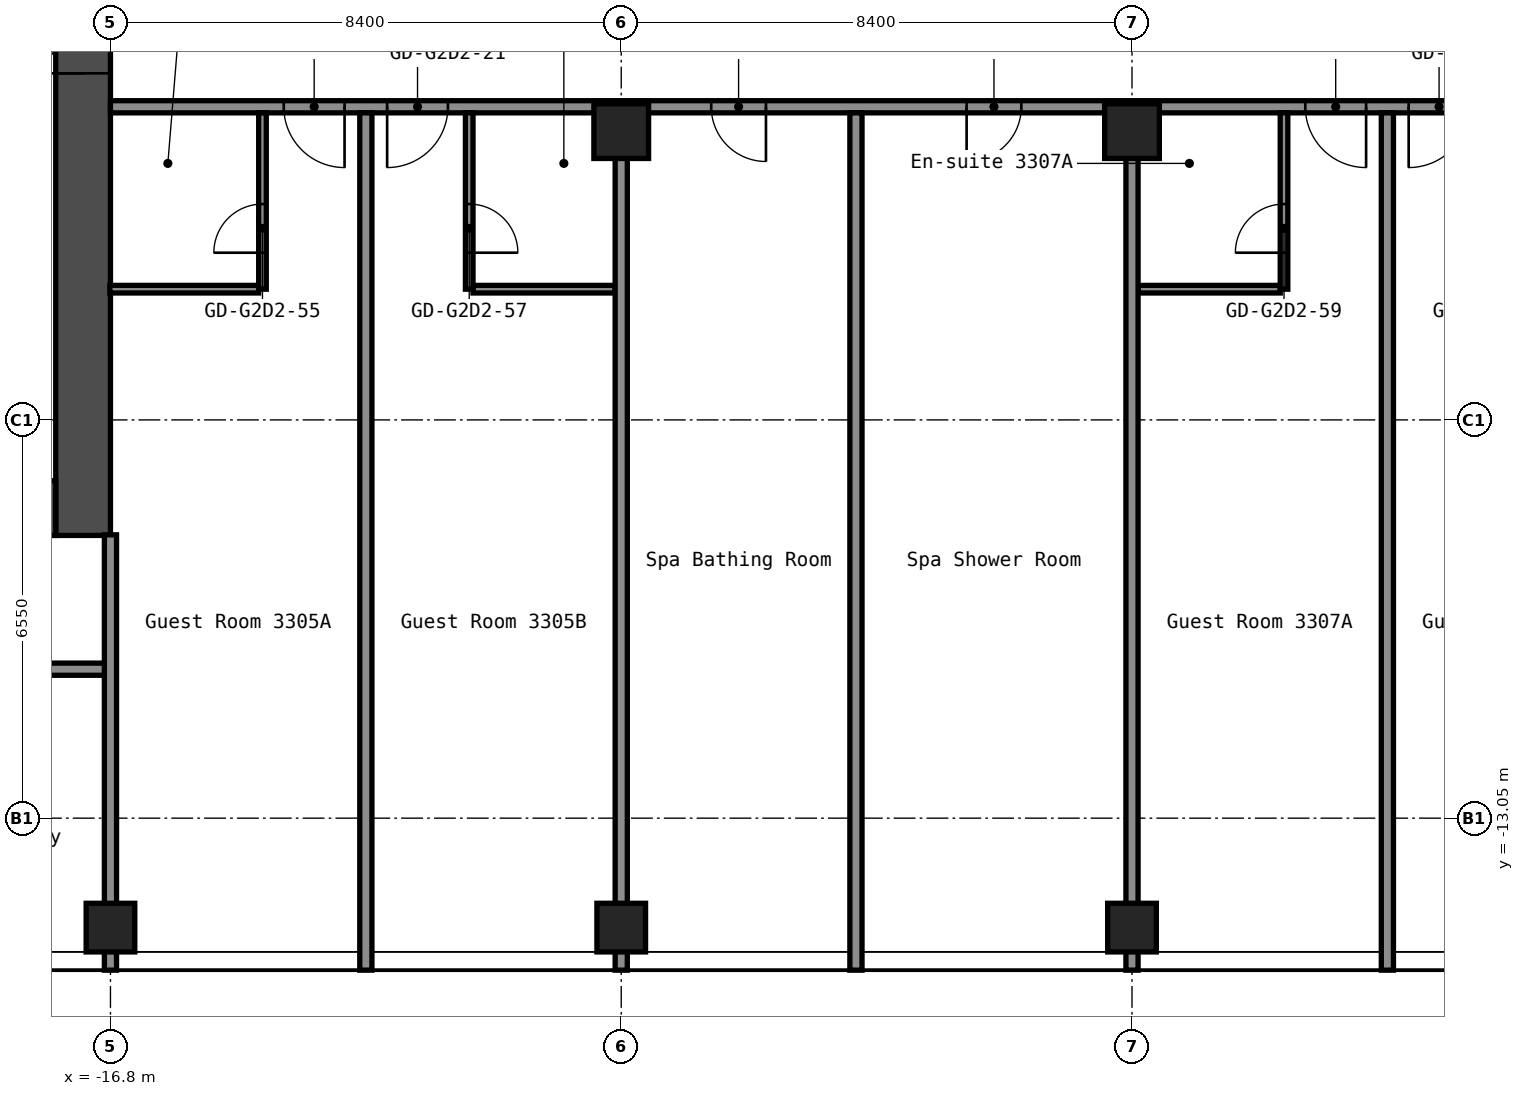
"""IFC4 building model, lengths in metres.
Left out: names, types, materials, properties, quantities, classifications, styles, units other than length and angle.
Written with IfcOpenShell. Run it as: python <this file> out.ifc"""

import sys

from ifc_helpers import new_model, si_unit, direction, frame, frame_2d, origin, origin_2d, place, context, subcontext, project, spatial, rectangle, hollow_rectangle, extrude, element, fill, save


model = new_model("IFC4")
c1 = context("Model", 3, precision=1e-05, world=origin(), true_north=direction((0.0, 1.0)))
c2 = subcontext(c1, "Body", "Model", "MODEL_VIEW")
j1 = project(units=[si_unit("LENGTHUNIT", "METRE"), si_unit("PLANEANGLEUNIT", "RADIAN")], contexts=[c1])
p1 = place(None, origin())
s1 = spatial("IfcSite", under=j1, at=p1, CompositionType="ELEMENT")
p2 = place(p1, origin())
s2 = spatial("IfcBuilding", under=s1, at=p2, CompositionType="ELEMENT")
p3 = place(p2, frame((0.0, 0.0, 117.0)))
s3 = spatial("IfcBuildingStorey", under=s2, at=p3, CompositionType="ELEMENT", Elevation=117.0)
for number, where, z_axis, x_axis in (
    (1, (-16.8, -14.85, 0.0), (0.0, 0.0, 1.0), (1.0, 0.0, 0.0)),
    (2, (-8.4, -14.85, 0.0), (0.0, 0.0, 1.0), (1.0, 0.0, 0.0)),
):
    element("IfcColumn", number, at=place(p3, frame(where, z_axis=z_axis, x_axis=x_axis)), inside=s3, PredefinedType="COLUMN", context=c2, shape_type="SweptSolid", body=[
        extrude(hollow_rectangle(XDim=0.8, YDim=0.8, WallThickness=0.032, at=origin_2d()), origin(), (0.0, 0.0, 1.0), 2.9),
    ])
p4 = place(p3, frame((-8.4, -1.75, 0.0), z_axis=(0.0, 0.0, 1.0), x_axis=(1.0, 0.0, 0.0)))
e3 = element("IfcColumn", 3, at=p4, inside=s3, PredefinedType="COLUMN", context=c2, shape_type="SweptSolid", body=[
    extrude(hollow_rectangle(XDim=0.9, YDim=0.9, WallThickness=0.036, at=origin_2d()), origin(), (0.0, 0.0, 1.0), 2.9),
])
p5 = place(p3, frame((0.0, -14.85, 0.0), z_axis=(0.0, 0.0, 1.0), x_axis=(1.0, 0.0, 0.0)))
e4 = element("IfcColumn", 4, at=p5, inside=s3, PredefinedType="COLUMN", context=c2, shape_type="SweptSolid", body=[
    extrude(hollow_rectangle(XDim=0.8, YDim=0.8, WallThickness=0.032, at=origin_2d()), origin(), (0.0, 0.0, 1.0), 2.9),
])
p6 = place(p3, frame((0.0, -1.75, 0.0), z_axis=(0.0, 0.0, 1.0), x_axis=(1.0, 0.0, 0.0)))
e5 = element("IfcColumn", 5, at=p6, inside=s3, PredefinedType="COLUMN", context=c2, shape_type="SweptSolid", body=[
    extrude(hollow_rectangle(XDim=0.9, YDim=0.9, WallThickness=0.036, at=origin_2d()), origin(), (0.0, 0.0, 1.0), 2.9),
])
p7 = place(p3, frame((-17.25, -8.4, 0.0), z_axis=(0.0, 0.0, 1.0), x_axis=(0.0, 1.0, 0.0)))
e6 = element("IfcWall", 6, at=p7, inside=s3, PredefinedType="SHEAR", context=c2, shape_type="SweptSolid", body=[
    extrude(rectangle(XDim=16.8, YDim=0.9, at=frame_2d((8.4, 0.0))), origin(), (0.0, 0.0, 1.0), 2.9),
])
p8 = place(p7, frame((7.6, 0.0, 0.0)))
e7 = element("IfcOpeningElement", 7, at=p8, cuts=e6, PredefinedType="OPENING", context=c2, shape_type="SweptSolid", body=[
    extrude(rectangle(XDim=1.2, YDim=2.1, at=frame_2d((0.6, 1.05))), frame((0.0, 0.46, 0.0), z_axis=(0.0, -1.0, 0.0), x_axis=(1.0, 0.0, 0.0)), (0.0, 0.0, 1.0), 0.92),
])
p9 = place(p3, frame((-32.7, -7.95, 0.0), z_axis=(0.0, 0.0, 1.0), x_axis=(1.0, 0.0, 0.0)))
e8 = element("IfcWall", 8, at=p9, inside=s3, PredefinedType="SHEAR", context=c2, shape_type="SweptSolid", body=[
    extrude(rectangle(XDim=15.0, YDim=0.9, at=frame_2d((7.5, 0.0))), origin(), (0.0, 0.0, 1.0), 2.9),
])
p10 = place(p9, frame((11.45, 0.0, 0.0)))
e9 = element("IfcOpeningElement", 9, at=p10, cuts=e8, PredefinedType="OPENING", context=c2, shape_type="SweptSolid", body=[
    extrude(rectangle(XDim=1.0, YDim=2.1, at=frame_2d((0.5, 1.05))), frame((0.0, 0.46, 0.0), z_axis=(0.0, -1.0, 0.0), x_axis=(1.0, 0.0, 0.0)), (0.0, 0.0, 1.0), 0.92),
])
p11 = place(p3, frame((-46.5, -10.6, 0.0), z_axis=(0.0, 0.0, 1.0), x_axis=(1.0, 0.0, 0.0)))
e10 = element("IfcWall", 10, at=p11, inside=s3, PredefinedType="PARTITIONING", context=c2, shape_type="SweptSolid", body=[
    extrude(rectangle(XDim=29.7, YDim=0.2, at=frame_2d((14.85, 0.0))), origin(), (0.0, 0.0, 1.0), 2.9),
])
p12 = place(p11, frame((1.95, 0.0, 0.0)))
e11 = element("IfcOpeningElement", 11, at=p12, cuts=e10, PredefinedType="OPENING", context=c2, shape_type="SweptSolid", body=[
    extrude(rectangle(XDim=0.9, YDim=2.1, at=frame_2d((0.45, 1.05))), frame((0.0, 0.11, 0.0), z_axis=(0.0, -1.0, 0.0), x_axis=(1.0, 0.0, 0.0)), (0.0, 0.0, 1.0), 0.22),
])
p13 = place(p11, frame((5.9, 0.0, 0.0)))
e12 = element("IfcOpeningElement", 12, at=p13, cuts=e10, PredefinedType="OPENING", context=c2, shape_type="SweptSolid", body=[
    extrude(rectangle(XDim=0.9, YDim=2.1, at=frame_2d((0.45, 1.05))), frame((0.0, 0.11, 0.0), z_axis=(0.0, -1.0, 0.0), x_axis=(1.0, 0.0, 0.0)), (0.0, 0.0, 1.0), 0.22),
])
p14 = place(p11, frame((10.1, 0.0, 0.0)))
e13 = element("IfcOpeningElement", 13, at=p14, cuts=e10, PredefinedType="OPENING", context=c2, shape_type="SweptSolid", body=[
    extrude(rectangle(XDim=0.9, YDim=2.1, at=frame_2d((0.45, 1.05))), frame((0.0, 0.11, 0.0), z_axis=(0.0, -1.0, 0.0), x_axis=(1.0, 0.0, 0.0)), (0.0, 0.0, 1.0), 0.22),
])
p15 = place(p11, frame((14.885, 0.0, 0.0)))
e14 = element("IfcOpeningElement", 14, at=p15, cuts=e10, PredefinedType="OPENING", context=c2, shape_type="SweptSolid", body=[
    extrude(rectangle(XDim=0.9, YDim=2.1, at=frame_2d((0.45, 1.05))), frame((0.0, 0.11, 0.0), z_axis=(0.0, -1.0, 0.0), x_axis=(1.0, 0.0, 0.0)), (0.0, 0.0, 1.0), 0.22),
])
p16 = place(p11, frame((19.085, 0.0, 0.0)))
e15 = element("IfcOpeningElement", 15, at=p16, cuts=e10, PredefinedType="OPENING", context=c2, shape_type="SweptSolid", body=[
    extrude(rectangle(XDim=0.9, YDim=2.1, at=frame_2d((0.45, 1.05))), frame((0.0, 0.11, 0.0), z_axis=(0.0, -1.0, 0.0), x_axis=(1.0, 0.0, 0.0)), (0.0, 0.0, 1.0), 0.22),
])
p17 = place(p11, frame((22.36, 0.0, 0.0)))
e16 = element("IfcOpeningElement", 16, at=p17, cuts=e10, PredefinedType="OPENING", context=c2, shape_type="SweptSolid", body=[
    extrude(rectangle(XDim=0.9, YDim=2.1, at=frame_2d((0.45, 1.05))), frame((0.0, 0.11, 0.0), z_axis=(0.0, -1.0, 0.0), x_axis=(1.0, 0.0, 0.0)), (0.0, 0.0, 1.0), 0.22),
])
p18 = place(p11, frame((26.56, 0.0, 0.0)))
e17 = element("IfcOpeningElement", 17, at=p18, cuts=e10, PredefinedType="OPENING", context=c2, shape_type="SweptSolid", body=[
    extrude(rectangle(XDim=0.9, YDim=2.1, at=frame_2d((0.45, 1.05))), frame((0.0, 0.11, 0.0), z_axis=(0.0, -1.0, 0.0), x_axis=(1.0, 0.0, 0.0)), (0.0, 0.0, 1.0), 0.22),
])
p19 = place(p3, frame((-16.81, -4.35, 0.0), z_axis=(0.0, 0.0, 1.0), x_axis=(1.0, 0.0, 0.0)))
e18 = element("IfcWall", 18, at=p19, inside=s3, PredefinedType="PARTITIONING", context=c2, shape_type="SweptSolid", body=[
    extrude(rectangle(XDim=2.448, YDim=0.125, at=frame_2d((1.224, 0.0))), origin(), (0.0, 0.0, 1.0), 2.9),
])
for number, where, z_axis, x_axis in (
    (19, (-10.837, -4.35, 0.0), (0.0, 0.0, 1.0), (1.0, 0.0, 0.0)),
    (20, (0.1, -4.35, 0.0), (0.0, 0.0, 1.0), (1.0, 0.0, 0.0)),
):
    element("IfcWall", number, at=place(p3, frame(where, z_axis=z_axis, x_axis=x_axis)), inside=s3, PredefinedType="PARTITIONING", context=c2, shape_type="SweptSolid", body=[
        extrude(rectangle(XDim=2.337, YDim=0.125, at=frame_2d((1.169, 0.0))), origin(), (0.0, 0.0, 1.0), 2.9),
    ])
p20 = place(p3, frame((-16.8, -1.35, 0.0), z_axis=(0.0, 0.0, 1.0), x_axis=(1.0, 0.0, 0.0)))
e21 = element("IfcWall", 21, at=p20, inside=s3, PredefinedType="PARTITIONING", context=c2, shape_type="SweptSolid", body=[
    extrude(rectangle(XDim=33.6, YDim=0.2, at=frame_2d((16.8, 0.0))), origin(), (0.0, 0.0, 1.0), 2.9),
])
p21 = place(p20, frame((2.85, 0.0, 0.0)))
e22 = element("IfcOpeningElement", 22, at=p21, cuts=e21, PredefinedType="OPENING", context=c2, shape_type="SweptSolid", body=[
    extrude(rectangle(XDim=1.0, YDim=2.1, at=frame_2d((0.5, 1.05))), frame((0.0, 0.11, 0.0), z_axis=(0.0, -1.0, 0.0), x_axis=(1.0, 0.0, 0.0)), (0.0, 0.0, 1.0), 0.22),
])
p22 = place(p20, frame((4.55, 0.0, 0.0)))
e23 = element("IfcOpeningElement", 23, at=p22, cuts=e21, PredefinedType="OPENING", context=c2, shape_type="SweptSolid", body=[
    extrude(rectangle(XDim=1.0, YDim=2.1, at=frame_2d((0.5, 1.05))), frame((0.0, 0.11, 0.0), z_axis=(0.0, -1.0, 0.0), x_axis=(1.0, 0.0, 0.0)), (0.0, 0.0, 1.0), 0.22),
])
p23 = place(p20, frame((9.88, 0.0, 0.0)))
e24 = element("IfcOpeningElement", 24, at=p23, cuts=e21, PredefinedType="OPENING", context=c2, shape_type="SweptSolid", body=[
    extrude(rectangle(XDim=0.9, YDim=2.1, at=frame_2d((0.45, 1.05))), frame((0.0, 0.11, 0.0), z_axis=(0.0, -1.0, 0.0), x_axis=(1.0, 0.0, 0.0)), (0.0, 0.0, 1.0), 0.22),
])
p24 = place(p20, frame((14.08, 0.0, 0.0)))
e25 = element("IfcOpeningElement", 25, at=p24, cuts=e21, PredefinedType="OPENING", context=c2, shape_type="SweptSolid", body=[
    extrude(rectangle(XDim=0.9, YDim=2.1, at=frame_2d((0.45, 1.05))), frame((0.0, 0.11, 0.0), z_axis=(0.0, -1.0, 0.0), x_axis=(1.0, 0.0, 0.0)), (0.0, 0.0, 1.0), 0.22),
])
p25 = place(p20, frame((19.65, 0.0, 0.0)))
e26 = element("IfcOpeningElement", 26, at=p25, cuts=e21, PredefinedType="OPENING", context=c2, shape_type="SweptSolid", body=[
    extrude(rectangle(XDim=1.0, YDim=2.1, at=frame_2d((0.5, 1.05))), frame((0.0, 0.11, 0.0), z_axis=(0.0, -1.0, 0.0), x_axis=(1.0, 0.0, 0.0)), (0.0, 0.0, 1.0), 0.22),
])
p26 = place(p20, frame((21.35, 0.0, 0.0)))
e27 = element("IfcOpeningElement", 27, at=p26, cuts=e21, PredefinedType="OPENING", context=c2, shape_type="SweptSolid", body=[
    extrude(rectangle(XDim=1.0, YDim=2.1, at=frame_2d((0.5, 1.05))), frame((0.0, 0.11, 0.0), z_axis=(0.0, -1.0, 0.0), x_axis=(1.0, 0.0, 0.0)), (0.0, 0.0, 1.0), 0.22),
])
p27 = place(p20, frame((27.2, 0.0, 0.0)))
e28 = element("IfcOpeningElement", 28, at=p27, cuts=e21, PredefinedType="OPENING", context=c2, shape_type="SweptSolid", body=[
    extrude(rectangle(XDim=1.0, YDim=2.1, at=frame_2d((0.5, 1.05))), frame((0.0, 0.11, 0.0), z_axis=(0.0, -1.0, 0.0), x_axis=(1.0, 0.0, 0.0)), (0.0, 0.0, 1.0), 0.22),
])
p28 = place(p3, frame((-16.8, -15.55, 0.0), z_axis=(0.0, 0.0, 1.0), x_axis=(0.0, 1.0, 0.0)))
e29 = element("IfcWall", 29, at=p28, inside=s3, PredefinedType="PARTITIONING", context=c2, shape_type="SweptSolid", body=[
    extrude(rectangle(XDim=7.16, YDim=0.2, at=frame_2d((3.58, 0.0))), origin(), (0.0, 0.0, 1.0), 2.9),
])
p29 = place(p3, frame((-14.3, -4.35, 0.0), z_axis=(0.0, 0.0, 1.0), x_axis=(0.0, 1.0, 0.0)))
e30 = element("IfcWall", 30, at=p29, inside=s3, PredefinedType="PARTITIONING", context=c2, shape_type="SweptSolid", body=[
    extrude(rectangle(XDim=2.9, YDim=0.125, at=frame_2d((1.45, 0.0))), origin(), (0.0, 0.0, 1.0), 2.9),
])
p30 = place(p29, frame((0.6, 0.0, 0.0)))
e31 = element("IfcOpeningElement", 31, at=p30, cuts=e30, PredefinedType="OPENING", context=c2, shape_type="SweptSolid", body=[
    extrude(rectangle(XDim=0.8, YDim=2.1, at=frame_2d((0.4, 1.05))), frame((0.0, 0.073, 0.0), z_axis=(0.0, -1.0, 0.0), x_axis=(1.0, 0.0, 0.0)), (0.0, 0.0, 1.0), 0.145),
])
p31 = place(p3, frame((-12.6, -15.55, 0.0), z_axis=(0.0, 0.0, 1.0), x_axis=(0.0, 1.0, 0.0)))
e32 = element("IfcWall", 32, at=p31, inside=s3, PredefinedType="PARTITIONING", context=c2, shape_type="SweptSolid", body=[
    extrude(rectangle(XDim=14.1, YDim=0.2, at=frame_2d((7.05, 0.0))), origin(), (0.0, 0.0, 1.0), 2.9),
])
p32 = place(p3, frame((-10.9, -4.35, 0.0), z_axis=(0.0, 0.0, 1.0), x_axis=(0.0, 1.0, 0.0)))
e33 = element("IfcWall", 33, at=p32, inside=s3, PredefinedType="PARTITIONING", context=c2, shape_type="SweptSolid", body=[
    extrude(rectangle(XDim=2.9, YDim=0.125, at=frame_2d((1.45, 0.0))), origin(), (0.0, 0.0, 1.0), 2.9),
])
p33 = place(p32, frame((0.6, 0.0, 0.0)))
e34 = element("IfcOpeningElement", 34, at=p33, cuts=e33, PredefinedType="OPENING", context=c2, shape_type="SweptSolid", body=[
    extrude(rectangle(XDim=0.8, YDim=2.1, at=frame_2d((0.4, 1.05))), frame((0.0, 0.073, 0.0), z_axis=(0.0, -1.0, 0.0), x_axis=(1.0, 0.0, 0.0)), (0.0, 0.0, 1.0), 0.145),
])
p34 = place(p3, frame((-8.4, -15.55, 0.0), z_axis=(0.0, 0.0, 1.0), x_axis=(0.0, 1.0, 0.0)))
e35 = element("IfcWall", 35, at=p34, inside=s3, PredefinedType="PARTITIONING", context=c2, shape_type="SweptSolid", body=[
    extrude(rectangle(XDim=13.36, YDim=0.2, at=frame_2d((6.68, 0.0))), origin(), (0.0, 0.0, 1.0), 2.9),
])
p35 = place(p3, frame((-4.54, -15.55, 0.0), z_axis=(0.0, 0.0, 1.0), x_axis=(0.0, 1.0, 0.0)))
e36 = element("IfcWall", 36, at=p35, inside=s3, PredefinedType="PARTITIONING", context=c2, shape_type="SweptSolid", body=[
    extrude(rectangle(XDim=14.1, YDim=0.2, at=frame_2d((7.05, 0.0))), origin(), (0.0, 0.0, 1.0), 2.9),
])
p36 = place(p3, frame((0.0, -15.55, 0.0), z_axis=(0.0, 0.0, 1.0), x_axis=(0.0, 1.0, 0.0)))
e37 = element("IfcWall", 37, at=p36, inside=s3, PredefinedType="PARTITIONING", context=c2, shape_type="SweptSolid", body=[
    extrude(rectangle(XDim=13.36, YDim=0.2, at=frame_2d((6.68, 0.0))), origin(), (0.0, 0.0, 1.0), 2.9),
])
p37 = place(p3, frame((2.5, -4.35, 0.0), z_axis=(0.0, 0.0, 1.0), x_axis=(0.0, 1.0, 0.0)))
e38 = element("IfcWall", 38, at=p37, inside=s3, PredefinedType="PARTITIONING", context=c2, shape_type="SweptSolid", body=[
    extrude(rectangle(XDim=2.9, YDim=0.125, at=frame_2d((1.45, 0.0))), origin(), (0.0, 0.0, 1.0), 2.9),
])
p38 = place(p37, frame((0.6, 0.0, 0.0)))
e39 = element("IfcOpeningElement", 39, at=p38, cuts=e38, PredefinedType="OPENING", context=c2, shape_type="SweptSolid", body=[
    extrude(rectangle(XDim=0.8, YDim=2.1, at=frame_2d((0.4, 1.05))), frame((0.0, 0.073, 0.0), z_axis=(0.0, -1.0, 0.0), x_axis=(1.0, 0.0, 0.0)), (0.0, 0.0, 1.0), 0.145),
])
p39 = place(p3, frame((4.2, -15.55, 0.0), z_axis=(0.0, 0.0, 1.0), x_axis=(0.0, 1.0, 0.0)))
e40 = element("IfcWall", 40, at=p39, inside=s3, PredefinedType="PARTITIONING", context=c2, shape_type="SweptSolid", body=[
    extrude(rectangle(XDim=14.1, YDim=0.2, at=frame_2d((7.05, 0.0))), origin(), (0.0, 0.0, 1.0), 2.9),
])
p40 = place(p8, origin())
e41 = element("IfcDoor", 41, at=p40, inside=s3, OperationType="DOUBLE_DOOR_SINGLE_SWING", PredefinedType="DOOR", context=c2, shape_type="SweptSolid", body=[
    extrude(rectangle(XDim=1.2, YDim=2.1, at=frame_2d((0.6, 1.05))), frame((0.0, 0.025, 0.0), z_axis=(0.0, -1.0, 0.0), x_axis=(1.0, 0.0, 0.0)), (0.0, 0.0, 1.0), 0.05),
])
fill(e7, e41)
p41 = place(p21, origin())
e42 = element("IfcDoor", 42, at=p41, inside=s3, OperationType="SINGLE_SWING_RIGHT", PredefinedType="DOOR", context=c2, shape_type="SweptSolid", body=[
    extrude(rectangle(XDim=1.0, YDim=2.1, at=frame_2d((0.5, 1.05))), frame((0.0, 0.025, 0.0), z_axis=(0.0, -1.0, 0.0), x_axis=(1.0, 0.0, 0.0)), (0.0, 0.0, 1.0), 0.05),
])
fill(e22, e42)
p42 = place(p22, origin())
e43 = element("IfcDoor", 43, at=p42, inside=s3, OperationType="SINGLE_SWING_LEFT", PredefinedType="DOOR", context=c2, shape_type="SweptSolid", body=[
    extrude(rectangle(XDim=1.0, YDim=2.1, at=frame_2d((0.5, 1.05))), frame((0.0, 0.025, 0.0), z_axis=(0.0, -1.0, 0.0), x_axis=(1.0, 0.0, 0.0)), (0.0, 0.0, 1.0), 0.05),
])
fill(e23, e43)
p43 = place(p23, origin())
e44 = element("IfcDoor", 44, at=p43, inside=s3, OperationType="SINGLE_SWING_RIGHT", PredefinedType="DOOR", context=c2, shape_type="SweptSolid", body=[
    extrude(rectangle(XDim=0.9, YDim=2.1, at=frame_2d((0.45, 1.05))), frame((0.0, 0.025, 0.0), z_axis=(0.0, -1.0, 0.0), x_axis=(1.0, 0.0, 0.0)), (0.0, 0.0, 1.0), 0.05),
])
fill(e24, e44)
p44 = place(p24, origin())
e45 = element("IfcDoor", 45, at=p44, inside=s3, OperationType="SINGLE_SWING_LEFT", PredefinedType="DOOR", context=c2, shape_type="SweptSolid", body=[
    extrude(rectangle(XDim=0.9, YDim=2.1, at=frame_2d((0.45, 1.05))), frame((0.0, 0.025, 0.0), z_axis=(0.0, -1.0, 0.0), x_axis=(1.0, 0.0, 0.0)), (0.0, 0.0, 1.0), 0.05),
])
fill(e25, e45)
p45 = place(p25, origin())
e46 = element("IfcDoor", 46, at=p45, inside=s3, OperationType="SINGLE_SWING_RIGHT", PredefinedType="DOOR", context=c2, shape_type="SweptSolid", body=[
    extrude(rectangle(XDim=1.0, YDim=2.1, at=frame_2d((0.5, 1.05))), frame((0.0, 0.025, 0.0), z_axis=(0.0, -1.0, 0.0), x_axis=(1.0, 0.0, 0.0)), (0.0, 0.0, 1.0), 0.05),
])
fill(e26, e46)
p46 = place(p26, origin())
e47 = element("IfcDoor", 47, at=p46, inside=s3, OperationType="SINGLE_SWING_LEFT", PredefinedType="DOOR", context=c2, shape_type="SweptSolid", body=[
    extrude(rectangle(XDim=1.0, YDim=2.1, at=frame_2d((0.5, 1.05))), frame((0.0, 0.025, 0.0), z_axis=(0.0, -1.0, 0.0), x_axis=(1.0, 0.0, 0.0)), (0.0, 0.0, 1.0), 0.05),
])
fill(e27, e47)
p47 = place(p30, origin())
e48 = element("IfcDoor", 48, at=p47, inside=s3, OperationType="SINGLE_SWING_RIGHT", PredefinedType="DOOR", context=c2, shape_type="SweptSolid", body=[
    extrude(rectangle(XDim=0.8, YDim=2.1, at=frame_2d((0.4, 1.05))), frame((0.0, 0.025, 0.0), z_axis=(0.0, -1.0, 0.0), x_axis=(1.0, 0.0, 0.0)), (0.0, 0.0, 1.0), 0.05),
])
fill(e31, e48)
p48 = place(p33, origin())
e49 = element("IfcDoor", 49, at=p48, inside=s3, OperationType="SINGLE_SWING_LEFT", PredefinedType="DOOR", context=c2, shape_type="SweptSolid", body=[
    extrude(rectangle(XDim=0.8, YDim=2.1, at=frame_2d((0.4, 1.05))), frame((0.0, 0.025, 0.0), z_axis=(0.0, -1.0, 0.0), x_axis=(1.0, 0.0, 0.0)), (0.0, 0.0, 1.0), 0.05),
])
fill(e34, e49)
p49 = place(p38, origin())
e50 = element("IfcDoor", 50, at=p49, inside=s3, OperationType="SINGLE_SWING_RIGHT", PredefinedType="DOOR", context=c2, shape_type="SweptSolid", body=[
    extrude(rectangle(XDim=0.8, YDim=2.1, at=frame_2d((0.4, 1.05))), frame((0.0, 0.025, 0.0), z_axis=(0.0, -1.0, 0.0), x_axis=(1.0, 0.0, 0.0)), (0.0, 0.0, 1.0), 0.05),
])
fill(e39, e50)
save(model, sys.argv[1])
